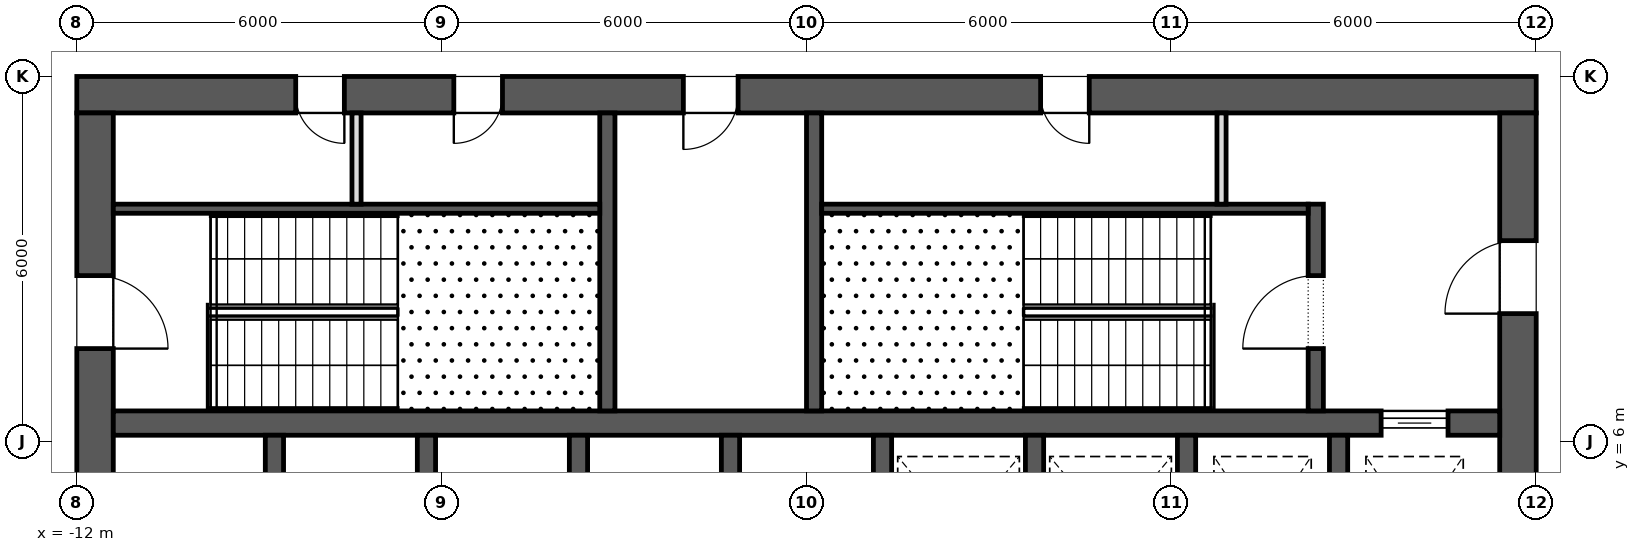
"""IFC4 building model, lengths in metres.
Left out: names, types, materials, properties, quantities, classifications, styles, units other than length and angle.
Written with IfcOpenShell. Run it as: python <this file> out.ifc"""

import sys

from ifc_helpers import new_model, si_unit, direction, frame, frame_2d, origin, place, context, subcontext, project, spatial, rectangle, extrude, element, fill, save


model = new_model("IFC4")
c1 = context("Model", 3, precision=1e-05, world=origin(), true_north=direction((0.0, 1.0)))
c2 = subcontext(c1, "Body", "Model", "MODEL_VIEW")
j1 = project(units=[si_unit("LENGTHUNIT", "METRE"), si_unit("PLANEANGLEUNIT", "RADIAN")], contexts=[c1])
p1 = place(None, origin())
s1 = spatial("IfcSite", under=j1, at=p1, CompositionType="ELEMENT")
p2 = place(p1, origin())
s2 = spatial("IfcBuilding", under=s1, at=p2, CompositionType="ELEMENT")
p3 = place(p2, frame((0.0, 0.0, 48.7)))
s3 = spatial("IfcBuildingStorey", under=s2, at=p3, CompositionType="ELEMENT", Elevation=48.7)
p4 = place(p3, frame((-12.0, 11.7, 0.0), z_axis=(0.0, 0.0, 1.0), x_axis=(1.0, 0.0, 0.0)))
e1 = element("IfcWall", 1, at=p4, inside=s3, PredefinedType="SHEAR", context=c2, shape_type="SweptSolid", body=[
    extrude(rectangle(XDim=24.0, YDim=0.6, at=frame_2d((12.0, 0.0))), origin(), (0.0, 0.0, 1.0), 4.2),
])
p5 = place(p4, frame((9.975, 0.0, 0.0)))
e2 = element("IfcOpeningElement", 2, at=p5, cuts=e1, PredefinedType="OPENING", context=c2, shape_type="SweptSolid", body=[
    extrude(rectangle(XDim=0.9, YDim=2.1, at=frame_2d((0.45, 1.05))), frame((0.0, 0.312, 0.0), z_axis=(0.0, -1.0, 0.0), x_axis=(1.0, 0.0, 0.0)), (0.0, 0.0, 1.0), 0.624),
])
p6 = place(p4, frame((3.6, 0.0, 0.0)))
e3 = element("IfcOpeningElement", 3, at=p6, cuts=e1, PredefinedType="OPENING", context=c2, shape_type="SweptSolid", body=[
    extrude(rectangle(XDim=0.8, YDim=2.1, at=frame_2d((0.4, 1.05))), frame((0.0, 0.312, 0.0), z_axis=(0.0, -1.0, 0.0), x_axis=(1.0, 0.0, 0.0)), (0.0, 0.0, 1.0), 0.624),
])
p7 = place(p4, frame((6.2, 0.0, 0.0)))
e4 = element("IfcOpeningElement", 4, at=p7, cuts=e1, PredefinedType="OPENING", context=c2, shape_type="SweptSolid", body=[
    extrude(rectangle(XDim=0.8, YDim=2.1, at=frame_2d((0.4, 1.05))), frame((0.0, 0.312, 0.0), z_axis=(0.0, -1.0, 0.0), x_axis=(1.0, 0.0, 0.0)), (0.0, 0.0, 1.0), 0.624),
])
p8 = place(p4, frame((15.85, 0.0, 0.0)))
e5 = element("IfcOpeningElement", 5, at=p8, cuts=e1, PredefinedType="OPENING", context=c2, shape_type="SweptSolid", body=[
    extrude(rectangle(XDim=0.8, YDim=2.1, at=frame_2d((0.4, 1.05))), frame((0.0, 0.312, 0.0), z_axis=(0.0, -1.0, 0.0), x_axis=(1.0, 0.0, 0.0)), (0.0, 0.0, 1.0), 0.624),
])
p9 = place(p3, frame((11.7, -11.4, 0.0), z_axis=(0.0, 0.0, 1.0), x_axis=(0.0, 1.0, 0.0)))
e6 = element("IfcWall", 6, at=p9, inside=s3, PredefinedType="SHEAR", context=c2, shape_type="SweptSolid", body=[
    extrude(rectangle(XDim=22.8, YDim=0.6, at=frame_2d((11.4, 0.0))), origin(), (0.0, 0.0, 1.0), 4.2),
])
p10 = place(p9, frame((10.2, 0.0, 0.0)))
e7 = element("IfcOpeningElement", 7, at=p10, cuts=e6, PredefinedType="OPENING", context=c2, shape_type="SweptSolid", body=[
    extrude(rectangle(XDim=2.4, YDim=2.1, at=frame_2d((1.2, 1.05))), frame((0.0, 0.312, 0.0), z_axis=(0.0, -1.0, 0.0), x_axis=(1.0, 0.0, 0.0)), (0.0, 0.0, 1.0), 0.624),
])
p11 = place(p9, frame((19.5, 0.0, 0.0)))
e8 = element("IfcOpeningElement", 8, at=p11, cuts=e6, PredefinedType="OPENING", context=c2, shape_type="SweptSolid", body=[
    extrude(rectangle(XDim=1.2, YDim=2.1, at=frame_2d((0.6, 1.05))), frame((0.0, 0.312, 0.0), z_axis=(0.0, -1.0, 0.0), x_axis=(1.0, 0.0, 0.0)), (0.0, 0.0, 1.0), 0.624),
])
p12 = place(p9, frame((2.1, 0.0, 0.0)))
e9 = element("IfcOpeningElement", 9, at=p12, cuts=e6, PredefinedType="OPENING", context=c2, shape_type="SweptSolid", body=[
    extrude(rectangle(XDim=1.2, YDim=2.1, at=frame_2d((0.6, 1.05))), frame((0.0, 0.312, 0.0), z_axis=(0.0, -1.0, 0.0), x_axis=(1.0, 0.0, 0.0)), (0.0, 0.0, 1.0), 0.624),
])
p13 = place(p3, frame((-11.7, -11.4, 0.0), z_axis=(0.0, 0.0, 1.0), x_axis=(0.0, 1.0, 0.0)))
e10 = element("IfcWall", 10, at=p13, inside=s3, PredefinedType="SHEAR", context=c2, shape_type="SweptSolid", body=[
    extrude(rectangle(XDim=22.8, YDim=0.6, at=frame_2d((11.4, 0.0))), origin(), (0.0, 0.0, 1.0), 4.2),
])
p14 = place(p13, frame((10.2, 0.0, 0.0)))
e11 = element("IfcOpeningElement", 11, at=p14, cuts=e10, PredefinedType="OPENING", context=c2, shape_type="SweptSolid", body=[
    extrude(rectangle(XDim=2.4, YDim=2.1, at=frame_2d((1.2, 1.05))), frame((0.0, 0.312, 0.0), z_axis=(0.0, -1.0, 0.0), x_axis=(1.0, 0.0, 0.0)), (0.0, 0.0, 1.0), 0.624),
])
p15 = place(p13, frame((18.925, 0.0, 0.0)))
e12 = element("IfcOpeningElement", 12, at=p15, cuts=e10, PredefinedType="OPENING", context=c2, shape_type="SweptSolid", body=[
    extrude(rectangle(XDim=1.2, YDim=2.1, at=frame_2d((0.6, 1.05))), frame((0.0, 0.312, 0.0), z_axis=(0.0, -1.0, 0.0), x_axis=(1.0, 0.0, 0.0)), (0.0, 0.0, 1.0), 0.624),
])
p16 = place(p13, frame((2.675, 0.0, 0.0)))
e13 = element("IfcOpeningElement", 13, at=p16, cuts=e10, PredefinedType="OPENING", context=c2, shape_type="SweptSolid", body=[
    extrude(rectangle(XDim=1.2, YDim=2.1, at=frame_2d((0.6, 1.05))), frame((0.0, 0.312, 0.0), z_axis=(0.0, -1.0, 0.0), x_axis=(1.0, 0.0, 0.0)), (0.0, 0.0, 1.0), 0.624),
])
p17 = place(p3, frame((-11.4, 6.3, 0.0), z_axis=(0.0, 0.0, 1.0), x_axis=(1.0, 0.0, 0.0)))
e14 = element("IfcWall", 14, at=p17, inside=s3, PredefinedType="SHEAR", context=c2, shape_type="SweptSolid", body=[
    extrude(rectangle(XDim=22.8, YDim=0.4, at=frame_2d((11.4, 0.0))), origin(), (0.0, 0.0, 1.0), 4.2),
])
p18 = place(p17, frame((20.85, 0.0, 0.0)))
e15 = element("IfcOpeningElement", 15, at=p18, cuts=e14, PredefinedType="OPENING", context=c2, shape_type="SweptSolid", body=[
    extrude(rectangle(XDim=1.1, YDim=2.1, at=frame_2d((0.55, 1.05))), frame((0.0, 0.212, 0.0), z_axis=(0.0, -1.0, 0.0), x_axis=(1.0, 0.0, 0.0)), (0.0, 0.0, 1.0), 0.424),
])
for number, where, z_axis, x_axis in (
    (16, (-8.75, 3.2, 0.0), (0.0, 0.0, 1.0), (0.0, 1.0, 0.0)),
    (17, (-6.25, 3.2, 0.0), (0.0, 0.0, 1.0), (0.0, 1.0, 0.0)),
    (18, (-3.75, 3.2, 0.0), (0.0, 0.0, 1.0), (0.0, 1.0, 0.0)),
    (19, (-1.25, 3.2, 0.0), (0.0, 0.0, 1.0), (0.0, 1.0, 0.0)),
    (20, (1.25, 3.2, 0.0), (0.0, 0.0, 1.0), (0.0, 1.0, 0.0)),
    (21, (3.75, 3.2, 0.0), (0.0, 0.0, 1.0), (0.0, 1.0, 0.0)),
    (22, (6.25, 3.2, 0.0), (0.0, 0.0, 1.0), (0.0, 1.0, 0.0)),
    (23, (8.75, 3.2, 0.0), (0.0, 0.0, 1.0), (0.0, 1.0, 0.0)),
):
    element("IfcWall", number, at=place(p3, frame(where, z_axis=z_axis, x_axis=x_axis)), inside=s3, PredefinedType="SHEAR", context=c2, shape_type="SweptSolid", body=[
        extrude(rectangle(XDim=2.9, YDim=0.3, at=frame_2d((1.45, 0.0))), origin(), (0.0, 0.0, 1.0), 4.2),
    ])
for number, where, z_axis, x_axis in (
    (24, (-3.275, 6.5, 0.0), (0.0, 0.0, 1.0), (0.0, 1.0, 0.0)),
    (25, (0.125, 6.5, 0.0), (0.0, 0.0, 1.0), (0.0, 1.0, 0.0)),
):
    element("IfcWall", number, at=place(p3, frame(where, z_axis=z_axis, x_axis=x_axis)), inside=s3, PredefinedType="SHEAR", context=c2, shape_type="SweptSolid", body=[
        extrude(rectangle(XDim=4.9, YDim=0.25, at=frame_2d((2.45, 0.0))), origin(), (0.0, 0.0, 1.0), 3.9),
    ])
p19 = place(p3, frame((8.375, 6.5, 0.0), z_axis=(0.0, 0.0, 1.0), x_axis=(0.0, 1.0, 0.0)))
e26 = element("IfcWall", 26, at=p19, inside=s3, PredefinedType="SHEAR", context=c2, shape_type="SweptSolid", body=[
    extrude(rectangle(XDim=3.4, YDim=0.25, at=frame_2d((1.7, 0.0))), origin(), (0.0, 0.0, 1.0), 3.9),
])
p20 = place(p19, frame((1.025, 0.0, 0.0)))
e27 = element("IfcOpeningElement", 27, at=p20, cuts=e26, PredefinedType="OPENING", context=c2, shape_type="SweptSolid", body=[
    extrude(rectangle(XDim=1.2, YDim=2.1, at=frame_2d((0.6, 1.05))), frame((0.0, 0.137, 0.0), z_axis=(0.0, -1.0, 0.0), x_axis=(1.0, 0.0, 0.0)), (0.0, 0.0, 1.0), 0.274),
])
for number, where, z_axis, x_axis in (
    (28, (-11.4, 9.825, 0.0), (0.0, 0.0, 1.0), (1.0, 0.0, 0.0)),
    (29, (0.25, 9.825, 0.0), (0.0, 0.0, 1.0), (1.0, 0.0, 0.0)),
):
    element("IfcWall", number, at=place(p3, frame(where, z_axis=z_axis, x_axis=x_axis)), inside=s3, PredefinedType="SHEAR", context=c2, shape_type="SweptSolid", body=[
        extrude(rectangle(XDim=8.0, YDim=0.15, at=frame_2d((4.0, 0.0))), origin(), (0.0, 0.0, 1.0), 3.9),
    ])
for number, where, z_axis, x_axis in (
    (30, (-7.4, 9.9, 0.0), (0.0, 0.0, 1.0), (0.0, 1.0, 0.0)),
    (31, (6.825, 9.9, 0.0), (0.0, 0.0, 1.0), (0.0, 1.0, 0.0)),
):
    element("IfcWall", number, at=place(p3, frame(where, z_axis=z_axis, x_axis=x_axis)), inside=s3, PredefinedType="PARTITIONING", context=c2, shape_type="SweptSolid", body=[
        extrude(rectangle(XDim=1.5, YDim=0.15, at=frame_2d((0.75, 0.0))), origin(), (0.0, 0.0, 1.0), 3.9),
    ])
p21 = place(p18, origin())
e32 = element("IfcDoor", 32, at=p21, inside=s3, OperationType="SLIDING_TO_LEFT", PredefinedType="DOOR", context=c2, shape_type="SweptSolid", body=[
    extrude(rectangle(XDim=1.1, YDim=2.1, at=frame_2d((0.55, 1.05))), frame((0.0, 0.025, 0.0), z_axis=(0.0, -1.0, 0.0), x_axis=(1.0, 0.0, 0.0)), (0.0, 0.0, 1.0), 0.05),
])
fill(e15, e32)
p22 = place(p15, frame((1.2, 0.0, 0.0), z_axis=(0.0, 0.0, 1.0), x_axis=(-1.0, 0.0, 0.0)))
e33 = element("IfcDoor", 33, at=p22, inside=s3, OperationType="SINGLE_SWING_LEFT", PredefinedType="DOOR", context=c2, shape_type="SweptSolid", body=[
    extrude(rectangle(XDim=1.2, YDim=2.1, at=frame_2d((0.6, 1.05))), frame((0.0, 0.025, 0.0), z_axis=(0.0, -1.0, 0.0), x_axis=(1.0, 0.0, 0.0)), (0.0, 0.0, 1.0), 0.05),
])
fill(e12, e33)
p23 = place(p20, origin())
e34 = element("IfcDoor", 34, at=p23, inside=s3, OperationType="SINGLE_SWING_RIGHT", PredefinedType="DOOR", context=c2, shape_type="SweptSolid", body=[
    extrude(rectangle(XDim=1.2, YDim=2.1, at=frame_2d((0.6, 1.05))), frame((0.0, 0.025, 0.0), z_axis=(0.0, -1.0, 0.0), x_axis=(1.0, 0.0, 0.0)), (0.0, 0.0, 1.0), 0.05),
])
fill(e27, e34)
p24 = place(p11, origin())
e35 = element("IfcDoor", 35, at=p24, inside=s3, OperationType="SINGLE_SWING_RIGHT", PredefinedType="DOOR", context=c2, shape_type="SweptSolid", body=[
    extrude(rectangle(XDim=1.2, YDim=2.1, at=frame_2d((0.6, 1.05))), frame((0.0, 0.025, 0.0), z_axis=(0.0, -1.0, 0.0), x_axis=(1.0, 0.0, 0.0)), (0.0, 0.0, 1.0), 0.05),
])
fill(e8, e35)
p25 = place(p5, frame((0.9, 0.0, 0.0), z_axis=(0.0, 0.0, 1.0), x_axis=(-1.0, 0.0, 0.0)))
e36 = element("IfcDoor", 36, at=p25, inside=s3, OperationType="SINGLE_SWING_LEFT", PredefinedType="DOOR", context=c2, shape_type="SweptSolid", body=[
    extrude(rectangle(XDim=0.9, YDim=2.1, at=frame_2d((0.45, 1.05))), frame((0.0, 0.025, 0.0), z_axis=(0.0, -1.0, 0.0), x_axis=(1.0, 0.0, 0.0)), (0.0, 0.0, 1.0), 0.05),
])
fill(e2, e36)
p26 = place(p6, frame((0.8, 0.0, 0.0), z_axis=(0.0, 0.0, 1.0), x_axis=(-1.0, 0.0, 0.0)))
e37 = element("IfcDoor", 37, at=p26, inside=s3, OperationType="SINGLE_SWING_RIGHT", PredefinedType="DOOR", context=c2, shape_type="SweptSolid", body=[
    extrude(rectangle(XDim=0.8, YDim=2.1, at=frame_2d((0.4, 1.05))), frame((0.0, 0.025, 0.0), z_axis=(0.0, -1.0, 0.0), x_axis=(1.0, 0.0, 0.0)), (0.0, 0.0, 1.0), 0.05),
])
fill(e3, e37)
p27 = place(p7, frame((0.8, 0.0, 0.0), z_axis=(0.0, 0.0, 1.0), x_axis=(-1.0, 0.0, 0.0)))
e38 = element("IfcDoor", 38, at=p27, inside=s3, OperationType="SINGLE_SWING_LEFT", PredefinedType="DOOR", context=c2, shape_type="SweptSolid", body=[
    extrude(rectangle(XDim=0.8, YDim=2.1, at=frame_2d((0.4, 1.05))), frame((0.0, 0.025, 0.0), z_axis=(0.0, -1.0, 0.0), x_axis=(1.0, 0.0, 0.0)), (0.0, 0.0, 1.0), 0.05),
])
fill(e4, e38)
p28 = place(p8, frame((0.8, 0.0, 0.0), z_axis=(0.0, 0.0, 1.0), x_axis=(-1.0, 0.0, 0.0)))
e39 = element("IfcDoor", 39, at=p28, inside=s3, OperationType="SINGLE_SWING_RIGHT", PredefinedType="DOOR", context=c2, shape_type="SweptSolid", body=[
    extrude(rectangle(XDim=0.8, YDim=2.1, at=frame_2d((0.4, 1.05))), frame((0.0, 0.025, 0.0), z_axis=(0.0, -1.0, 0.0), x_axis=(1.0, 0.0, 0.0)), (0.0, 0.0, 1.0), 0.05),
])
fill(e5, e39)
save(model, sys.argv[1])
